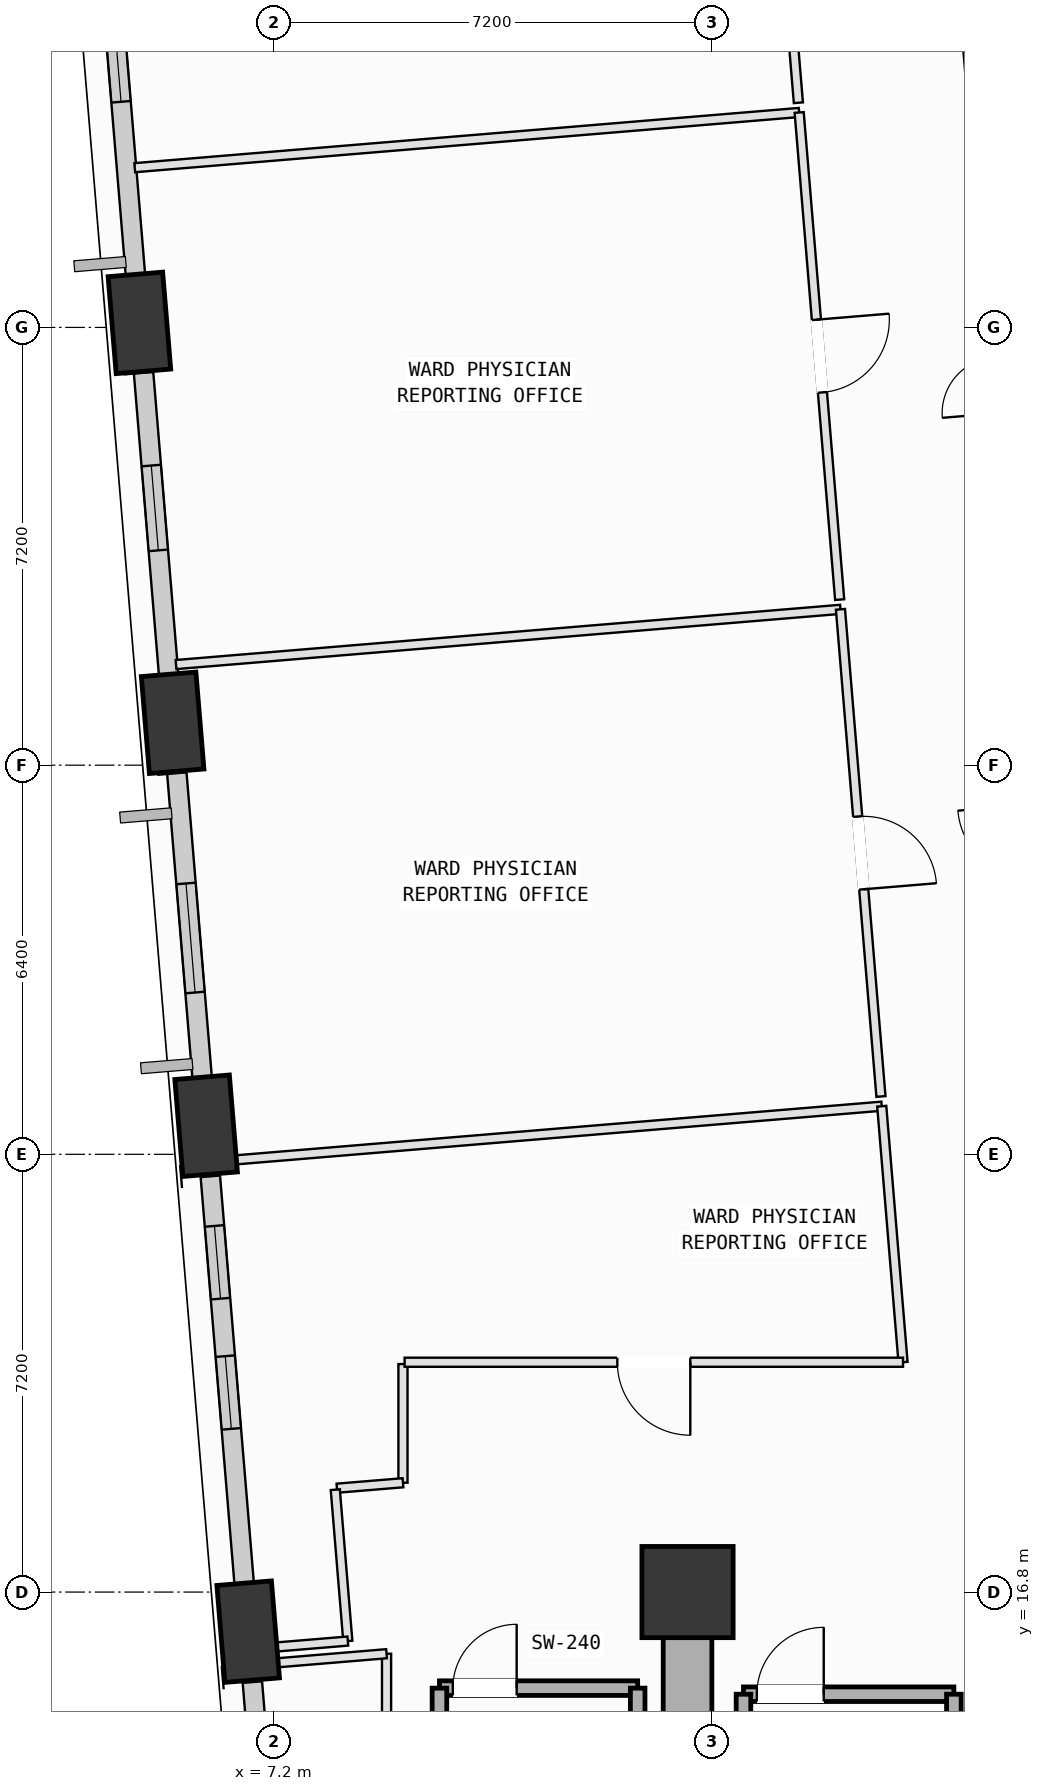
"""IFC4 building model, lengths in metres.
Left out: names, types, materials, properties, quantities, classifications, styles, units other than length and angle.
Written with IfcOpenShell. Run it as: python <this file> out.ifc"""

import sys

from ifc_helpers import new_model, si_unit, direction, frame, frame_2d, origin, origin_2d, place, context, subcontext, project, spatial, rectangle, extrude, element, fill, save


model = new_model("IFC4")
c1 = context("Model", 3, precision=1e-05, world=origin(), true_north=direction((0.0, 1.0)))
c2 = subcontext(c1, "Body", "Model", "MODEL_VIEW")
j1 = project(units=[si_unit("LENGTHUNIT", "METRE"), si_unit("PLANEANGLEUNIT", "RADIAN")], contexts=[c1])
p1 = place(None, origin())
s1 = spatial("IfcSite", under=j1, at=p1, CompositionType="ELEMENT")
p2 = place(p1, origin())
s2 = spatial("IfcBuilding", under=s1, at=p2, CompositionType="ELEMENT")
p3 = place(p2, frame((0.0, 0.0, 43.0)))
s3 = spatial("IfcBuildingStorey", under=s2, at=p3, CompositionType="ELEMENT", Elevation=43.0)
p4 = place(p3, frame((14.0, 16.8, 0.0), z_axis=(0.0, 0.0, 1.0), x_axis=(1.0, 0.0, 0.0)))
e1 = element("IfcColumn", 1, at=p4, inside=s3, PredefinedType="COLUMN", context=c2, shape_type="SweptSolid", body=[
    extrude(rectangle(XDim=1.5, YDim=1.5, at=origin_2d()), origin(), (0.0, 0.0, 1.0), 4.0),
])
p5 = place(p3, frame((4.986, 37.675, 0.002), z_axis=(-0.051975028871, -0.118064488659, 0.991644781609), x_axis=(0.322383773593, 0.93783910321, 0.128555509462)))
e2 = element("IfcColumn", 2, at=p5, inside=s3, PredefinedType="COLUMN", context=c2, shape_type="SweptSolid", body=[
    extrude(rectangle(XDim=1.6, YDim=0.9, at=origin_2d()), origin(), (0.0, 0.0, 1.0), 4.03),
])
p6 = place(p3, frame((5.532, 31.097, 0.002), z_axis=(-0.024930331489, -0.115734969538, 0.992967217685), x_axis=(0.127428183267, 0.98480559743, 0.117983021577)))
e3 = element("IfcColumn", 3, at=p6, inside=s3, PredefinedType="COLUMN", context=c2, shape_type="SweptSolid", body=[
    extrude(rectangle(XDim=1.6, YDim=0.9, at=origin_2d()), origin(), (0.0, 0.0, 1.0), 4.025),
])
p7 = place(p3, frame((6.083, 24.47, 0.002), z_axis=(0.002306361863, -0.113315199963, 0.993556413171), x_axis=(-0.102939792592, 0.988253930152, 0.112949407435)))
e4 = element("IfcColumn", 4, at=p7, inside=s3, PredefinedType="COLUMN", context=c2, shape_type="SweptSolid", body=[
    extrude(rectangle(XDim=1.6, YDim=0.9, at=origin_2d()), origin(), (0.0, 0.0, 1.0), 4.022),
])
p8 = place(p3, frame((6.774, 16.149, 0.002), z_axis=(0.036526226116, -0.110124751497, 0.993246381274), x_axis=(-0.390213029027, 0.913435534093, 0.11562576285)))
e5 = element("IfcColumn", 5, at=p8, inside=s3, PredefinedType="COLUMN", context=c2, shape_type="SweptSolid", body=[
    extrude(rectangle(XDim=1.6, YDim=0.9, at=origin_2d()), origin(), (0.0, 0.0, 1.0), 4.024),
])
p9 = place(p3, frame((4.955, 38.04, 0.0), z_axis=(0.0, 0.0, 1.0), x_axis=(-0.082778568816, 0.99656796484, 0.0)))
e6 = element("IfcWall", 6, at=p9, inside=s3, PredefinedType="SOLIDWALL", context=c2, shape_type="SweptSolid", body=[
    extrude(rectangle(XDim=5.223, YDim=0.32, at=frame_2d((2.612, 0.0))), origin(), (0.0, 0.0, 1.0), 3.165),
])
p10 = place(p9, frame((3.282, 0.0, 0.75)))
e7 = element("IfcOpeningElement", 7, at=p10, cuts=e6, PredefinedType="OPENING", context=c2, shape_type="SweptSolid", body=[
    extrude(rectangle(XDim=1.2, YDim=1.75, at=frame_2d((0.6, 0.875))), frame((0.0, 0.17, 0.0), z_axis=(0.0, -1.0, 0.0), x_axis=(1.0, 0.0, 0.0)), (0.0, 0.0, 1.0), 0.34),
])
p11 = place(p3, frame((5.501, 31.472, 0.0), z_axis=(0.0, 0.0, 1.0), x_axis=(-0.082813534863, 0.996565059815, 0.0)))
e8 = element("IfcWall", 8, at=p11, inside=s3, PredefinedType="SOLIDWALL", context=c2, shape_type="SweptSolid", body=[
    extrude(rectangle(XDim=5.401, YDim=0.32, at=frame_2d((2.7, 0.0))), origin(), (0.0, 0.0, 1.0), 3.165),
])
p12 = place(p11, frame((2.469, 0.0, 0.75)))
e9 = element("IfcOpeningElement", 9, at=p12, cuts=e8, PredefinedType="OPENING", context=c2, shape_type="SweptSolid", body=[
    extrude(rectangle(XDim=1.4, YDim=1.85, at=frame_2d((0.7, 0.925))), frame((0.0, 0.17, 0.0), z_axis=(0.0, -1.0, 0.0), x_axis=(1.0, 0.0, 0.0)), (0.0, 0.0, 1.0), 0.34),
])
p13 = place(p3, frame((6.051, 24.849, 0.0), z_axis=(0.0, 0.0, 1.0), x_axis=(-0.082785398729, 0.996567397499, 0.0)))
e10 = element("IfcWall", 10, at=p13, inside=s3, PredefinedType="SOLIDWALL", context=c2, shape_type="SweptSolid", body=[
    extrude(rectangle(XDim=5.438, YDim=0.32, at=frame_2d((2.719, 0.0))), origin(), (0.0, 0.0, 1.0), 3.165),
])
p14 = place(p13, frame((1.818, 0.0, 0.75)))
e11 = element("IfcOpeningElement", 11, at=p14, cuts=e10, PredefinedType="OPENING", context=c2, shape_type="SweptSolid", body=[
    extrude(rectangle(XDim=1.8, YDim=2.05, at=frame_2d((0.9, 1.025))), frame((0.0, 0.17, 0.0), z_axis=(0.0, -1.0, 0.0), x_axis=(1.0, 0.0, 0.0)), (0.0, 0.0, 1.0), 0.34),
])
p15 = place(p3, frame((6.743, 16.526, 0.0), z_axis=(0.0, 0.0, 1.0), x_axis=(-0.082790664038, 0.996566960093, 0.0)))
e12 = element("IfcWall", 12, at=p15, inside=s3, PredefinedType="SOLIDWALL", context=c2, shape_type="SweptSolid", body=[
    extrude(rectangle(XDim=7.136, YDim=0.32, at=frame_2d((3.568, 0.0))), origin(), (0.0, 0.0, 1.0), 3.165),
])
p16 = place(p15, frame((2.969, 0.0, 0.75)))
e13 = element("IfcOpeningElement", 13, at=p16, cuts=e12, PredefinedType="OPENING", context=c2, shape_type="SweptSolid", body=[
    extrude(rectangle(XDim=1.2, YDim=1.75, at=frame_2d((0.6, 0.875))), frame((0.0, 0.17, 0.0), z_axis=(0.0, -1.0, 0.0), x_axis=(1.0, 0.0, 0.0)), (0.0, 0.0, 1.0), 0.34),
])
p17 = place(p15, frame((5.117, 0.0, 0.75)))
e14 = element("IfcOpeningElement", 14, at=p17, cuts=e12, PredefinedType="OPENING", context=c2, shape_type="SweptSolid", body=[
    extrude(rectangle(XDim=1.2, YDim=1.75, at=frame_2d((0.6, 0.875))), frame((0.0, 0.17, 0.0), z_axis=(0.0, -1.0, 0.0), x_axis=(1.0, 0.0, 0.0)), (0.0, 0.0, 1.0), 0.34),
])
p18 = place(p3, frame((7.34, 9.343, 0.0), z_axis=(0.0, 0.0, 1.0), x_axis=(-0.082806264978, 0.996565663908, 0.0)))
e15 = element("IfcWall", 15, at=p18, inside=s3, PredefinedType="SOLIDWALL", context=c2, shape_type="SweptSolid", body=[
    extrude(rectangle(XDim=5.997, YDim=0.32, at=frame_2d((2.999, 0.0))), origin(), (0.0, 0.0, 1.0), 3.165),
])
p19 = place(p18, frame((2.2, 0.0, 0.75)))
e16 = element("IfcOpeningElement", 16, at=p19, cuts=e15, PredefinedType="OPENING", context=c2, shape_type="SweptSolid", body=[
    extrude(rectangle(XDim=1.6, YDim=1.95, at=frame_2d((0.8, 0.975))), frame((0.0, 0.17, 0.0), z_axis=(0.0, -1.0, 0.0), x_axis=(1.0, 0.0, 0.0)), (0.0, 0.0, 1.0), 0.34),
])
p20 = place(p3, frame((14.92, 15.12, 0.0), z_axis=(0.0, 0.0, 1.0), x_axis=(1.0, 0.0, 0.0)))
e17 = element("IfcWall", 17, at=p20, inside=s3, PredefinedType="SOLIDWALL", context=c2, shape_type="SweptSolid", body=[
    extrude(rectangle(XDim=3.46, YDim=0.24, at=frame_2d((1.73, 0.0))), origin(), (0.0, 0.0, 1.0), 3.78),
])
p21 = place(p20, frame((0.22, 0.0, 0.0)))
e18 = element("IfcOpeningElement", 18, at=p21, cuts=e17, PredefinedType="OPENING", context=c2, shape_type="SweptSolid", body=[
    extrude(rectangle(XDim=1.1, YDim=2.15, at=frame_2d((0.55, 1.075))), frame((0.0, 0.13, 0.0), z_axis=(0.0, -1.0, 0.0), x_axis=(1.0, 0.0, 0.0)), (0.0, 0.0, 1.0), 0.26),
])
for number, where, z_axis, x_axis in (
    (19, (18.38, 15.12, 0.0), (0.0, 0.0, 1.0), (0.0, -1.0, 0.0)),
    (20, (14.92, 8.2, 0.0), (0.0, 0.0, 1.0), (0.0, 1.0, 0.0)),
):
    element("IfcWall", number, at=place(p3, frame(where, z_axis=z_axis, x_axis=x_axis)), inside=s3, PredefinedType="SOLIDWALL", context=c2, shape_type="SweptSolid", body=[
        extrude(rectangle(XDim=6.92, YDim=0.24, at=frame_2d((3.46, 0.0))), origin(), (0.0, 0.0, 1.0), 3.78),
    ])
p22 = place(p3, frame((9.92, 15.22, 0.0), z_axis=(0.0, 0.0, 1.0), x_axis=(1.0, 0.0, 0.0)))
e21 = element("IfcWall", 21, at=p22, inside=s3, PredefinedType="SOLIDWALL", context=c2, shape_type="SweptSolid", body=[
    extrude(rectangle(XDim=3.26, YDim=0.24, at=frame_2d((1.63, 0.0))), origin(), (0.0, 0.0, 1.0), 3.78),
])
p23 = place(p22, frame((0.22, 0.0, 0.0)))
e22 = element("IfcOpeningElement", 22, at=p23, cuts=e21, PredefinedType="OPENING", context=c2, shape_type="SweptSolid", body=[
    extrude(rectangle(XDim=1.05, YDim=2.15, at=frame_2d((0.525, 1.075))), frame((0.0, 0.13, 0.0), z_axis=(0.0, -1.0, 0.0), x_axis=(1.0, 0.0, 0.0)), (0.0, 0.0, 1.0), 0.26),
])
for number, where, z_axis, x_axis in (
    (23, (13.18, 15.22, 0.0), (0.0, 0.0, 1.0), (0.0, -1.0, 0.0)),
    (24, (9.92, 8.17, 0.0), (0.0, 0.0, 1.0), (0.0, 1.0, 0.0)),
):
    element("IfcWall", number, at=place(p3, frame(where, z_axis=z_axis, x_axis=x_axis)), inside=s3, PredefinedType="SOLIDWALL", context=c2, shape_type="SweptSolid", body=[
        extrude(rectangle(XDim=7.05, YDim=0.24, at=frame_2d((3.525, 0.0))), origin(), (0.0, 0.0, 1.0), 3.78),
    ])
p24 = place(p3, frame((14.0, 16.8, 0.0), z_axis=(0.0, 0.0, 1.0), x_axis=(0.0, -1.0, 0.0)))
e25 = element("IfcWall", 25, at=p24, inside=s3, PredefinedType="SHEAR", context=c2, shape_type="SweptSolid", body=[
    extrude(rectangle(XDim=9.0, YDim=0.8, at=frame_2d((4.5, 0.0))), origin(), (0.0, 0.0, 1.0), 3.78),
])
p25 = place(p3, frame((9.05, 15.786, 0.0), z_axis=(0.0, 0.0, 1.0), x_axis=(0.0, -1.0, 0.0)))
e26 = element("IfcWall", 26, at=p25, inside=s3, PredefinedType="PARTITIONING", context=c2, shape_type="SweptSolid", body=[
    extrude(rectangle(XDim=8.286, YDim=0.15, at=frame_2d((4.143, 0.0))), origin(), (0.0, 0.0, 1.0), 3.78),
])
p26 = place(p3, frame((6.67, 15.588, 0.0), z_axis=(0.0, 0.0, 1.0), x_axis=(0.996557732461, 0.082901663866, 0.0)))
e27 = element("IfcWall", 27, at=p26, inside=s3, PredefinedType="PARTITIONING", context=c2, shape_type="SweptSolid", body=[
    extrude(rectangle(XDim=2.388, YDim=0.15, at=frame_2d((1.194, 0.0))), origin(), (0.0, 0.0, 1.0), 2.865),
])
p27 = place(p3, frame((9.32, 20.55, 0.0), z_axis=(0.0, 0.0, 1.0), x_axis=(0.0, -1.0, 0.0)))
e28 = element("IfcWall", 28, at=p27, inside=s3, PredefinedType="PARTITIONING", context=c2, shape_type="SweptSolid", body=[
    extrude(rectangle(XDim=1.952, YDim=0.15, at=frame_2d((0.976, 0.0))), origin(), (0.0, 0.0, 1.0), 3.78),
])
p28 = place(p3, frame((9.32, 18.598, 0.0), z_axis=(0.0, 0.0, 1.0), x_axis=(-0.99659655083, -0.082433699866, 0.0)))
e29 = element("IfcWall", 29, at=p28, inside=s3, PredefinedType="PARTITIONING", context=c2, shape_type="SweptSolid", body=[
    extrude(rectangle(XDim=1.09, YDim=0.15, at=frame_2d((0.545, 0.0))), origin(), (0.0, 0.0, 1.0), 3.78),
])
p29 = place(p3, frame((8.207, 18.484, 0.0), z_axis=(0.0, 0.0, 1.0), x_axis=(0.082471307272, -0.996593439411, 0.0)))
e30 = element("IfcWall", 30, at=p29, inside=s3, PredefinedType="PARTITIONING", context=c2, shape_type="SweptSolid", body=[
    extrude(rectangle(XDim=2.499, YDim=0.15, at=frame_2d((1.249, 0.0))), origin(), (0.0, 0.0, 1.0), 3.78),
])
p30 = place(p3, frame((8.413, 15.994, 0.0), z_axis=(0.0, 0.0, 1.0), x_axis=(-0.996582966353, -0.082597767369, 0.0)))
e31 = element("IfcWall", 31, at=p30, inside=s3, PredefinedType="PARTITIONING", context=c2, shape_type="SweptSolid", body=[
    extrude(rectangle(XDim=1.85, YDim=0.15, at=frame_2d((0.925, 0.0))), origin(), (0.0, 0.0, 1.0), 2.865),
])
p31 = place(p3, frame((6.569, 15.841, 0.0), z_axis=(0.0, 0.0, 1.0), x_axis=(-0.082561739403, 0.996585951731, 0.0)))
e32 = element("IfcWall", 32, at=p31, inside=s3, PredefinedType="PARTITIONING", context=c2, shape_type="SweptSolid", body=[
    extrude(rectangle(XDim=0.668, YDim=0.15, at=frame_2d((0.334, 0.0))), origin(), (0.0, 0.0, 1.0), 3.165),
])
p32 = place(p3, frame((5.903, 23.853, 0.0), z_axis=(0.0, 0.0, 1.0), x_axis=(0.996567124878, 0.082788680457, 0.0)))
e33 = element("IfcWall", 33, at=p32, inside=s3, PredefinedType="PARTITIONING", context=c2, shape_type="SweptSolid", body=[
    extrude(rectangle(XDim=11.33, YDim=0.15, at=frame_2d((5.665, 0.0))), origin(), (0.0, 0.0, 1.0), 3.78),
])
p33 = place(p3, frame((17.194, 24.791, 0.0), z_axis=(0.0, 0.0, 1.0), x_axis=(0.082796829764, -0.99656644785, 0.0)))
e34 = element("IfcWall", 34, at=p33, inside=s3, PredefinedType="PARTITIONING", context=c2, shape_type="SweptSolid", body=[
    extrude(rectangle(XDim=4.225, YDim=0.15, at=frame_2d((2.113, 0.0))), origin(), (0.0, 0.0, 1.0), 3.78),
])
p34 = place(p3, frame((17.544, 20.58, 0.0), z_axis=(0.0, 0.0, 1.0), x_axis=(-1.0, 0.0, 0.0)))
e35 = element("IfcWall", 35, at=p34, inside=s3, PredefinedType="PARTITIONING", context=c2, shape_type="SweptSolid", body=[
    extrude(rectangle(XDim=8.197, YDim=0.15, at=frame_2d((4.099, 0.0))), origin(), (0.0, 0.0, 1.0), 3.78),
])
p35 = place(p34, frame((3.499, 0.0, 0.0)))
e36 = element("IfcOpeningElement", 36, at=p35, cuts=e35, PredefinedType="OPENING", context=c2, shape_type="SweptSolid", body=[
    extrude(rectangle(XDim=1.2, YDim=2.15, at=frame_2d((0.6, 1.075))), frame((0.0, 0.085, 0.0), z_axis=(0.0, -1.0, 0.0), x_axis=(1.0, 0.0, 0.0)), (0.0, 0.0, 1.0), 0.17),
])
p36 = place(p3, frame((5.588, 32.055, 0.0), z_axis=(0.0, 0.0, 1.0), x_axis=(0.996565539079, 0.082807767273, 0.0)))
e37 = element("IfcWall", 37, at=p36, inside=s3, PredefinedType="PARTITIONING", context=c2, shape_type="SweptSolid", body=[
    extrude(rectangle(XDim=10.965, YDim=0.15, at=frame_2d((5.482, 0.0))), origin(), (0.0, 0.0, 1.0), 3.365),
])
p37 = place(p3, frame((16.515, 32.963, 0.0), z_axis=(0.0, 0.0, 1.0), x_axis=(0.082841912697, -0.996562701239, 0.0)))
e38 = element("IfcWall", 38, at=p37, inside=s3, PredefinedType="PARTITIONING", context=c2, shape_type="SweptSolid", body=[
    extrude(rectangle(XDim=8.04, YDim=0.15, at=frame_2d((4.02, 0.0))), origin(), (0.0, 0.0, 1.0), 3.78),
])
p38 = place(p37, frame((3.42, 0.0, 0.0)))
e39 = element("IfcOpeningElement", 39, at=p38, cuts=e38, PredefinedType="OPENING", context=c2, shape_type="SweptSolid", body=[
    extrude(rectangle(XDim=1.2, YDim=2.15, at=frame_2d((0.6, 1.075))), frame((0.0, 0.085, 0.0), z_axis=(0.0, -1.0, 0.0), x_axis=(1.0, 0.0, 0.0)), (0.0, 0.0, 1.0), 0.17),
])
p39 = place(p3, frame((5.89, 24.013, 0.0), z_axis=(0.0, 0.0, 1.0), x_axis=(-0.082774421865, 0.996568309292, 0.0)))
e40 = element("IfcWall", 40, at=p39, inside=s3, PredefinedType="PARTITIONING", context=c2, shape_type="SweptSolid", body=[
    extrude(rectangle(XDim=0.82, YDim=0.15, at=frame_2d((0.41, 0.0))), origin(), (0.0, 0.0, 1.0), 3.165),
])
p40 = place(p3, frame((5.372, 30.249, 0.0), z_axis=(0.0, 0.0, 1.0), x_axis=(-0.082861496646, 0.996561073078, 0.0)))
e41 = element("IfcWall", 41, at=p40, inside=s3, PredefinedType="PARTITIONING", context=c2, shape_type="SweptSolid", body=[
    extrude(rectangle(XDim=1.208, YDim=0.15, at=frame_2d((0.604, 0.0))), origin(), (0.0, 0.0, 1.0), 3.165),
])
p41 = place(p3, frame((4.909, 40.227, 0.0), z_axis=(0.0, 0.0, 1.0), x_axis=(0.996565539079, 0.082807767273, 0.0)))
e42 = element("IfcWall", 42, at=p41, inside=s3, PredefinedType="PARTITIONING", context=c2, shape_type="SweptSolid", body=[
    extrude(rectangle(XDim=10.965, YDim=0.15, at=frame_2d((5.482, 0.0))), origin(), (0.0, 0.0, 1.0), 3.78),
])
p42 = place(p3, frame((15.836, 41.135, 0.0), z_axis=(0.0, 0.0, 1.0), x_axis=(0.082841912697, -0.996562701239, 0.0)))
e43 = element("IfcWall", 43, at=p42, inside=s3, PredefinedType="PARTITIONING", context=c2, shape_type="SweptSolid", body=[
    extrude(rectangle(XDim=8.04, YDim=0.15, at=frame_2d((4.02, 0.0))), origin(), (0.0, 0.0, 1.0), 3.78),
])
p43 = place(p42, frame((3.42, 0.0, 0.0)))
e44 = element("IfcOpeningElement", 44, at=p43, cuts=e43, PredefinedType="OPENING", context=c2, shape_type="SweptSolid", body=[
    extrude(rectangle(XDim=1.2, YDim=2.15, at=frame_2d((0.6, 1.075))), frame((0.0, 0.085, 0.0), z_axis=(0.0, -1.0, 0.0), x_axis=(1.0, 0.0, 0.0)), (0.0, 0.0, 1.0), 0.17),
])
p44 = place(p3, frame((4.824, 36.835, 0.0), z_axis=(0.0, 0.0, 1.0), x_axis=(-0.082264475924, 0.99661053376, 0.0)))
e45 = element("IfcWall", 45, at=p44, inside=s3, PredefinedType="PARTITIONING", context=c2, shape_type="SweptSolid", body=[
    extrude(rectangle(XDim=1.19, YDim=0.15, at=frame_2d((0.595, 0.0))), origin(), (0.0, 0.0, 1.0), 3.165),
])
p45 = place(p3, frame((15.185, 48.978, 0.0), z_axis=(0.0, 0.0, 1.0), x_axis=(0.082746711322, -0.996570610527, 0.0)))
e46 = element("IfcWall", 46, at=p45, inside=s3, PredefinedType="PARTITIONING", context=c2, shape_type="SweptSolid", body=[
    extrude(rectangle(XDim=7.709, YDim=0.15, at=frame_2d((3.855, 0.0))), origin(), (0.0, 0.0, 1.0), 2.865),
])
p46 = place(p45, frame((3.255, 0.0, 0.0)))
e47 = element("IfcOpeningElement", 47, at=p46, cuts=e46, PredefinedType="OPENING", context=c2, shape_type="SweptSolid", body=[
    extrude(rectangle(XDim=1.2, YDim=2.15, at=frame_2d((0.6, 1.075))), frame((0.0, 0.085, 0.0), z_axis=(0.0, -1.0, 0.0), x_axis=(1.0, 0.0, 0.0)), (0.0, 0.0, 1.0), 0.17),
])
p47 = place(p3, frame((18.714, 40.923, 0.0), z_axis=(0.0, 0.0, 1.0), x_axis=(-0.082858919776, 0.996561287334, 0.0)))
e48 = element("IfcWall", 48, at=p47, inside=s3, PredefinedType="PARTITIONING", context=c2, shape_type="SweptSolid", body=[
    extrude(rectangle(XDim=8.014, YDim=0.15, at=frame_2d((4.007, 0.0))), origin(), (0.0, 0.0, 1.0), 3.78),
])
p48 = place(p47, frame((3.547, 0.0, 0.0)))
e49 = element("IfcOpeningElement", 49, at=p48, cuts=e48, PredefinedType="OPENING", context=c2, shape_type="SweptSolid", body=[
    extrude(rectangle(XDim=0.92, YDim=2.1, at=frame_2d((0.46, 1.05))), frame((0.0, 0.085, 0.0), z_axis=(0.0, -1.0, 0.0), x_axis=(1.0, 0.0, 0.0)), (0.0, 0.0, 1.0), 0.17),
])
p49 = place(p10, origin())
e50 = element("IfcWindow", 50, at=p49, inside=s3, PartitioningType="SINGLE_PANEL", PredefinedType="WINDOW", context=c2, shape_type="SweptSolid", body=[
    extrude(rectangle(XDim=1.2, YDim=1.75, at=frame_2d((0.6, 0.875))), frame((0.0, 0.03, 0.0), z_axis=(0.0, -1.0, 0.0), x_axis=(1.0, 0.0, 0.0)), (0.0, 0.0, 1.0), 0.06),
])
fill(e7, e50)
p50 = place(p12, origin())
e51 = element("IfcWindow", 51, at=p50, inside=s3, PartitioningType="SINGLE_PANEL", PredefinedType="WINDOW", context=c2, shape_type="SweptSolid", body=[
    extrude(rectangle(XDim=1.4, YDim=1.85, at=frame_2d((0.7, 0.925))), frame((0.0, 0.03, 0.0), z_axis=(0.0, -1.0, 0.0), x_axis=(1.0, 0.0, 0.0)), (0.0, 0.0, 1.0), 0.06),
])
fill(e9, e51)
p51 = place(p14, origin())
e52 = element("IfcWindow", 52, at=p51, inside=s3, PartitioningType="SINGLE_PANEL", PredefinedType="WINDOW", context=c2, shape_type="SweptSolid", body=[
    extrude(rectangle(XDim=1.8, YDim=2.05, at=frame_2d((0.9, 1.025))), frame((0.0, 0.03, 0.0), z_axis=(0.0, -1.0, 0.0), x_axis=(1.0, 0.0, 0.0)), (0.0, 0.0, 1.0), 0.06),
])
fill(e11, e52)
p52 = place(p16, origin())
e53 = element("IfcWindow", 53, at=p52, inside=s3, PartitioningType="SINGLE_PANEL", PredefinedType="WINDOW", context=c2, shape_type="SweptSolid", body=[
    extrude(rectangle(XDim=1.2, YDim=1.75, at=frame_2d((0.6, 0.875))), frame((0.0, 0.03, 0.0), z_axis=(0.0, -1.0, 0.0), x_axis=(1.0, 0.0, 0.0)), (0.0, 0.0, 1.0), 0.06),
])
fill(e13, e53)
p53 = place(p17, origin())
e54 = element("IfcWindow", 54, at=p53, inside=s3, PartitioningType="SINGLE_PANEL", PredefinedType="WINDOW", context=c2, shape_type="SweptSolid", body=[
    extrude(rectangle(XDim=1.2, YDim=1.75, at=frame_2d((0.6, 0.875))), frame((0.0, 0.03, 0.0), z_axis=(0.0, -1.0, 0.0), x_axis=(1.0, 0.0, 0.0)), (0.0, 0.0, 1.0), 0.06),
])
fill(e14, e54)
p54 = place(p21, origin())
e55 = element("IfcDoor", 55, at=p54, inside=s3, OperationType="SINGLE_SWING_RIGHT", PredefinedType="DOOR", context=c2, shape_type="SweptSolid", body=[
    extrude(rectangle(XDim=1.1, YDim=2.15, at=frame_2d((0.55, 1.075))), frame((0.0, 0.025, 0.0), z_axis=(0.0, -1.0, 0.0), x_axis=(1.0, 0.0, 0.0)), (0.0, 0.0, 1.0), 0.05),
])
fill(e18, e55)
p55 = place(p23, origin())
e56 = element("IfcDoor", 56, at=p55, inside=s3, OperationType="SINGLE_SWING_RIGHT", PredefinedType="DOOR", context=c2, shape_type="SweptSolid", body=[
    extrude(rectangle(XDim=1.05, YDim=2.15, at=frame_2d((0.525, 1.075))), frame((0.0, 0.025, 0.0), z_axis=(0.0, -1.0, 0.0), x_axis=(1.0, 0.0, 0.0)), (0.0, 0.0, 1.0), 0.05),
])
fill(e22, e56)
p56 = place(p35, origin())
e57 = element("IfcDoor", 57, at=p56, inside=s3, OperationType="SINGLE_SWING_LEFT", PredefinedType="DOOR", context=c2, shape_type="SweptSolid", body=[
    extrude(rectangle(XDim=1.2, YDim=2.15, at=frame_2d((0.6, 1.075))), frame((0.0, 0.025, 0.0), z_axis=(0.0, -1.0, 0.0), x_axis=(1.0, 0.0, 0.0)), (0.0, 0.0, 1.0), 0.05),
])
fill(e36, e57)
p57 = place(p38, origin())
e58 = element("IfcDoor", 58, at=p57, inside=s3, OperationType="SINGLE_SWING_RIGHT", PredefinedType="DOOR", context=c2, shape_type="SweptSolid", body=[
    extrude(rectangle(XDim=1.2, YDim=2.15, at=frame_2d((0.6, 1.075))), frame((0.0, 0.025, 0.0), z_axis=(0.0, -1.0, 0.0), x_axis=(1.0, 0.0, 0.0)), (0.0, 0.0, 1.0), 0.05),
])
fill(e39, e58)
p58 = place(p43, origin())
e59 = element("IfcDoor", 59, at=p58, inside=s3, OperationType="SINGLE_SWING_LEFT", PredefinedType="DOOR", context=c2, shape_type="SweptSolid", body=[
    extrude(rectangle(XDim=1.2, YDim=2.15, at=frame_2d((0.6, 1.075))), frame((0.0, 0.025, 0.0), z_axis=(0.0, -1.0, 0.0), x_axis=(1.0, 0.0, 0.0)), (0.0, 0.0, 1.0), 0.05),
])
fill(e44, e59)
save(model, sys.argv[1])
